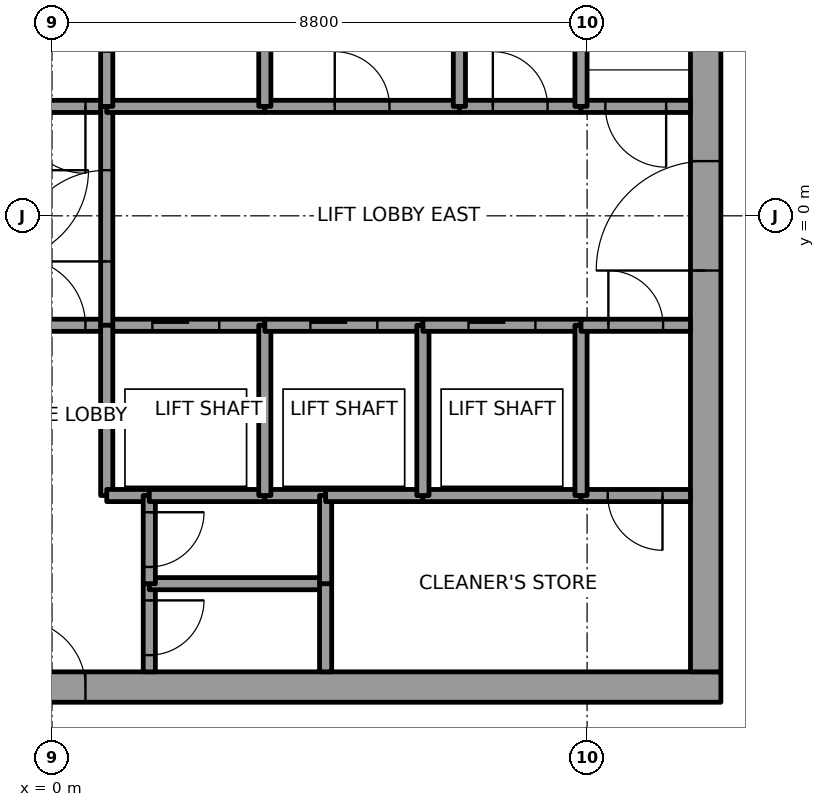
"""IFC4 building model, lengths in metres.
Left out: names, types, materials, properties, quantities, classifications, styles, units other than length and angle.
Written with IfcOpenShell. Run it as: python <this file> out.ifc"""

import sys

from ifc_helpers import new_model, si_unit, direction, frame, frame_2d, origin, place, context, subcontext, project, spatial, rectangle, extrude, element, fill, save


model = new_model("IFC4")
c1 = context("Model", 3, precision=1e-05, world=origin(), true_north=direction((0.0, 1.0)))
c2 = subcontext(c1, "Body", "Model", "MODEL_VIEW")
j1 = project(units=[si_unit("LENGTHUNIT", "METRE"), si_unit("PLANEANGLEUNIT", "RADIAN")], contexts=[c1])
p1 = place(None, origin())
s1 = spatial("IfcSite", under=j1, at=p1, CompositionType="ELEMENT")
p2 = place(p1, origin())
s2 = spatial("IfcBuilding", under=s1, at=p2, CompositionType="ELEMENT")
p3 = place(p2, frame((0.0, 0.0, 291.0)))
s3 = spatial("IfcBuildingStorey", under=s2, at=p3, CompositionType="ELEMENT", Elevation=291.0)
p4 = place(p3, frame((-11.0, -7.75, 0.0), z_axis=(0.0, 0.0, 1.0), x_axis=(1.0, 0.0, 0.0)))
e1 = element("IfcWall", 1, at=p4, inside=s3, PredefinedType="SHEAR", context=c2, shape_type="SweptSolid", body=[
    extrude(rectangle(XDim=22.0, YDim=0.5, at=frame_2d((11.0, 0.0))), origin(), (0.0, 0.0, 1.0), 4.0),
])
p5 = place(p4, frame((10.45, 0.0, 0.0)))
e2 = element("IfcOpeningElement", 2, at=p5, cuts=e1, PredefinedType="OPENING", context=c2, shape_type="SweptSolid", body=[
    extrude(rectangle(XDim=1.1, YDim=2.1, at=frame_2d((0.55, 1.05))), frame((0.0, 0.25, 0.0), z_axis=(0.0, -1.0, 0.0), x_axis=(1.0, 0.0, 0.0)), (0.0, 0.0, 1.0), 0.5),
])
p6 = place(p3, frame((10.75, -7.5, 0.0), z_axis=(0.0, 0.0, 1.0), x_axis=(0.0, 1.0, 0.0)))
e3 = element("IfcWall", 3, at=p6, inside=s3, PredefinedType="SHEAR", context=c2, shape_type="SweptSolid", body=[
    extrude(rectangle(XDim=15.0, YDim=0.5, at=frame_2d((7.5, 0.0))), origin(), (0.0, 0.0, 1.0), 4.0),
])
p7 = place(p6, frame((6.6, 0.0, 0.0)))
e4 = element("IfcOpeningElement", 4, at=p7, cuts=e3, PredefinedType="OPENING", context=c2, shape_type="SweptSolid", body=[
    extrude(rectangle(XDim=1.8, YDim=2.1, at=frame_2d((0.9, 1.05))), frame((0.0, 0.25, 0.0), z_axis=(0.0, -1.0, 0.0), x_axis=(1.0, 0.0, 0.0)), (0.0, 0.0, 1.0), 0.5),
])
p8 = place(p3, frame((-0.9, -1.8, 0.0), z_axis=(0.0, 0.0, 1.0), x_axis=(1.0, 0.0, 0.0)))
e5 = element("IfcWall", 5, at=p8, inside=s3, PredefinedType="SOLIDWALL", context=c2, shape_type="SweptSolid", body=[
    extrude(rectangle(XDim=1.8, YDim=0.2, at=frame_2d((0.9, 0.0))), origin(), (0.0, 0.0, 1.0), 3.85),
])
p9 = place(p8, frame((0.35, 0.0, 0.0)))
e6 = element("IfcOpeningElement", 6, at=p9, cuts=e5, PredefinedType="OPENING", context=c2, shape_type="SweptSolid", body=[
    extrude(rectangle(XDim=1.1, YDim=2.1, at=frame_2d((0.55, 1.05))), frame((0.0, 0.1, 0.0), z_axis=(0.0, -1.0, 0.0), x_axis=(1.0, 0.0, 0.0)), (0.0, 0.0, 1.0), 0.2),
])
p10 = place(p3, frame((0.9, 1.8, 0.0), z_axis=(0.0, 0.0, 1.0), x_axis=(-1.0, 0.0, 0.0)))
e7 = element("IfcWall", 7, at=p10, inside=s3, PredefinedType="SOLIDWALL", context=c2, shape_type="SweptSolid", body=[
    extrude(rectangle(XDim=1.8, YDim=0.2, at=frame_2d((0.9, 0.0))), origin(), (0.0, 0.0, 1.0), 3.85),
])
p11 = place(p10, frame((0.35, 0.0, 0.0)))
e8 = element("IfcOpeningElement", 8, at=p11, cuts=e7, PredefinedType="OPENING", context=c2, shape_type="SweptSolid", body=[
    extrude(rectangle(XDim=1.1, YDim=2.1, at=frame_2d((0.55, 1.05))), frame((0.0, 0.1, 0.0), z_axis=(0.0, -1.0, 0.0), x_axis=(1.0, 0.0, 0.0)), (0.0, 0.0, 1.0), 0.2),
])
p12 = place(p3, frame((0.9, -1.8, 0.0), z_axis=(0.0, 0.0, 1.0), x_axis=(1.0, 0.0, 0.0)))
e9 = element("IfcWall", 9, at=p12, inside=s3, PredefinedType="SOLIDWALL", context=c2, shape_type="SweptSolid", body=[
    extrude(rectangle(XDim=2.6, YDim=0.2, at=frame_2d((1.3, 0.0))), origin(), (0.0, 0.0, 1.0), 3.85),
])
p13 = place(p12, frame((0.75, 0.0, 0.0)))
e10 = element("IfcOpeningElement", 10, at=p13, cuts=e9, PredefinedType="OPENING", context=c2, shape_type="SweptSolid", body=[
    extrude(rectangle(XDim=1.1, YDim=2.1, at=frame_2d((0.55, 1.05))), frame((0.0, 0.1, 0.0), z_axis=(0.0, -1.0, 0.0), x_axis=(1.0, 0.0, 0.0)), (0.0, 0.0, 1.0), 0.2),
])
p14 = place(p3, frame((0.9, -1.8, 0.0), z_axis=(0.0, 0.0, 1.0), x_axis=(0.0, 1.0, 0.0)))
e11 = element("IfcWall", 11, at=p14, inside=s3, PredefinedType="SOLIDWALL", context=c2, shape_type="SweptSolid", body=[
    extrude(rectangle(XDim=3.6, YDim=0.2, at=frame_2d((1.8, 0.0))), origin(), (0.0, 0.0, 1.0), 3.85),
])
p15 = place(p14, frame((1.05, 0.0, 0.0)))
e12 = element("IfcOpeningElement", 12, at=p15, cuts=e11, PredefinedType="OPENING", context=c2, shape_type="SweptSolid", body=[
    extrude(rectangle(XDim=1.5, YDim=2.1, at=frame_2d((0.75, 1.05))), frame((0.0, 0.1, 0.0), z_axis=(0.0, -1.0, 0.0), x_axis=(1.0, 0.0, 0.0)), (0.0, 0.0, 1.0), 0.2),
])
p16 = place(p3, frame((0.9, -1.8, 0.0), z_axis=(0.0, 0.0, 1.0), x_axis=(0.0, -1.0, 0.0)))
e13 = element("IfcWall", 13, at=p16, inside=s3, PredefinedType="SOLIDWALL", context=c2, shape_type="SweptSolid", body=[
    extrude(rectangle(XDim=2.8, YDim=0.2, at=frame_2d((1.4, 0.0))), origin(), (0.0, 0.0, 1.0), 3.85),
])
p17 = place(p3, frame((0.9, -4.6, 0.0), z_axis=(0.0, 0.0, 1.0), x_axis=(1.0, 0.0, 0.0)))
e14 = element("IfcWall", 14, at=p17, inside=s3, PredefinedType="SOLIDWALL", context=c2, shape_type="SweptSolid", body=[
    extrude(rectangle(XDim=0.7, YDim=0.2, at=frame_2d((0.35, 0.0))), origin(), (0.0, 0.0, 1.0), 3.85),
])
p18 = place(p3, frame((3.5, 1.8, 0.0), z_axis=(0.0, 0.0, 1.0), x_axis=(-1.0, 0.0, 0.0)))
e15 = element("IfcWall", 15, at=p18, inside=s3, PredefinedType="SOLIDWALL", context=c2, shape_type="SweptSolid", body=[
    extrude(rectangle(XDim=2.6, YDim=0.2, at=frame_2d((1.3, 0.0))), origin(), (0.0, 0.0, 1.0), 3.85),
])
p19 = place(p3, frame((0.9, 4.8, 0.0), z_axis=(0.0, 0.0, 1.0), x_axis=(0.0, -1.0, 0.0)))
e16 = element("IfcWall", 16, at=p19, inside=s3, PredefinedType="SOLIDWALL", context=c2, shape_type="SweptSolid", body=[
    extrude(rectangle(XDim=3.0, YDim=0.2, at=frame_2d((1.5, 0.0))), origin(), (0.0, 0.0, 1.0), 3.85),
])
p20 = place(p19, frame((0.9, 0.0, 0.0)))
e17 = element("IfcOpeningElement", 17, at=p20, cuts=e16, PredefinedType="OPENING", context=c2, shape_type="SweptSolid", body=[
    extrude(rectangle(XDim=1.2, YDim=2.1, at=frame_2d((0.6, 1.05))), frame((0.0, 0.1, 0.0), z_axis=(0.0, -1.0, 0.0), x_axis=(1.0, 0.0, 0.0)), (0.0, 0.0, 1.0), 0.2),
])
p21 = place(p3, frame((1.6, -6.05, 0.0), z_axis=(0.0, 0.0, 1.0), x_axis=(0.0, -1.0, 0.0)))
e18 = element("IfcWall", 18, at=p21, inside=s3, PredefinedType="SOLIDWALL", context=c2, shape_type="SweptSolid", body=[
    extrude(rectangle(XDim=1.45, YDim=0.2, at=frame_2d((0.725, 0.0))), origin(), (0.0, 0.0, 1.0), 3.85),
])
p22 = place(p21, frame((0.275, 0.0, 0.0)))
e19 = element("IfcOpeningElement", 19, at=p22, cuts=e18, PredefinedType="OPENING", context=c2, shape_type="SweptSolid", body=[
    extrude(rectangle(XDim=0.9, YDim=2.1, at=frame_2d((0.45, 1.05))), frame((0.0, 0.1, 0.0), z_axis=(0.0, -1.0, 0.0), x_axis=(1.0, 0.0, 0.0)), (0.0, 0.0, 1.0), 0.2),
])
p23 = place(p3, frame((4.5, -6.05, 0.0), z_axis=(0.0, 0.0, 1.0), x_axis=(-1.0, 0.0, 0.0)))
e20 = element("IfcWall", 20, at=p23, inside=s3, PredefinedType="SOLIDWALL", context=c2, shape_type="SweptSolid", body=[
    extrude(rectangle(XDim=2.9, YDim=0.2, at=frame_2d((1.45, 0.0))), origin(), (0.0, 0.0, 1.0), 3.85),
])
p24 = place(p3, frame((1.6, -4.6, 0.0), z_axis=(0.0, 0.0, 1.0), x_axis=(0.0, -1.0, 0.0)))
e21 = element("IfcWall", 21, at=p24, inside=s3, PredefinedType="SOLIDWALL", context=c2, shape_type="SweptSolid", body=[
    extrude(rectangle(XDim=1.45, YDim=0.2, at=frame_2d((0.725, 0.0))), origin(), (0.0, 0.0, 1.0), 3.85),
])
p25 = place(p24, frame((0.275, 0.0, 0.0)))
e22 = element("IfcOpeningElement", 22, at=p25, cuts=e21, PredefinedType="OPENING", context=c2, shape_type="SweptSolid", body=[
    extrude(rectangle(XDim=0.9, YDim=2.1, at=frame_2d((0.45, 1.05))), frame((0.0, 0.1, 0.0), z_axis=(0.0, -1.0, 0.0), x_axis=(1.0, 0.0, 0.0)), (0.0, 0.0, 1.0), 0.2),
])
p26 = place(p3, frame((3.5, -4.6, 0.0), z_axis=(0.0, 0.0, 1.0), x_axis=(-1.0, 0.0, 0.0)))
e23 = element("IfcWall", 23, at=p26, inside=s3, PredefinedType="SOLIDWALL", context=c2, shape_type="SweptSolid", body=[
    extrude(rectangle(XDim=1.9, YDim=0.2, at=frame_2d((0.95, 0.0))), origin(), (0.0, 0.0, 1.0), 3.85),
])
p27 = place(p3, frame((4.5, -4.6, 0.0), z_axis=(0.0, 0.0, 1.0), x_axis=(-1.0, 0.0, 0.0)))
e24 = element("IfcWall", 24, at=p27, inside=s3, PredefinedType="SOLIDWALL", context=c2, shape_type="SweptSolid", body=[
    extrude(rectangle(XDim=1.0, YDim=0.2, at=frame_2d((0.5, 0.0))), origin(), (0.0, 0.0, 1.0), 3.85),
])
p28 = place(p3, frame((3.5, -4.6, 0.0), z_axis=(0.0, 0.0, 1.0), x_axis=(0.0, 1.0, 0.0)))
e25 = element("IfcWall", 25, at=p28, inside=s3, PredefinedType="SOLIDWALL", context=c2, shape_type="SweptSolid", body=[
    extrude(rectangle(XDim=2.8, YDim=0.2, at=frame_2d((1.4, 0.0))), origin(), (0.0, 0.0, 1.0), 3.85),
])
p29 = place(p3, frame((3.5, -1.8, 0.0), z_axis=(0.0, 0.0, 1.0), x_axis=(1.0, 0.0, 0.0)))
e26 = element("IfcWall", 26, at=p29, inside=s3, PredefinedType="SOLIDWALL", context=c2, shape_type="SweptSolid", body=[
    extrude(rectangle(XDim=2.6, YDim=0.2, at=frame_2d((1.3, 0.0))), origin(), (0.0, 0.0, 1.0), 3.85),
])
p30 = place(p29, frame((0.75, 0.0, 0.0)))
e27 = element("IfcOpeningElement", 27, at=p30, cuts=e26, PredefinedType="OPENING", context=c2, shape_type="SweptSolid", body=[
    extrude(rectangle(XDim=1.1, YDim=2.1, at=frame_2d((0.55, 1.05))), frame((0.0, 0.1, 0.0), z_axis=(0.0, -1.0, 0.0), x_axis=(1.0, 0.0, 0.0)), (0.0, 0.0, 1.0), 0.2),
])
p31 = place(p3, frame((3.5, 1.8, 0.0), z_axis=(0.0, 0.0, 1.0), x_axis=(1.0, 0.0, 0.0)))
e28 = element("IfcWall", 28, at=p31, inside=s3, PredefinedType="SOLIDWALL", context=c2, shape_type="SweptSolid", body=[
    extrude(rectangle(XDim=3.2, YDim=0.2, at=frame_2d((1.6, 0.0))), origin(), (0.0, 0.0, 1.0), 3.85),
])
p32 = place(p31, frame((1.15, 0.0, 0.0)))
e29 = element("IfcOpeningElement", 29, at=p32, cuts=e28, PredefinedType="OPENING", context=c2, shape_type="SweptSolid", body=[
    extrude(rectangle(XDim=0.9, YDim=2.1, at=frame_2d((0.45, 1.05))), frame((0.0, 0.1, 0.0), z_axis=(0.0, -1.0, 0.0), x_axis=(1.0, 0.0, 0.0)), (0.0, 0.0, 1.0), 0.2),
])
p33 = place(p3, frame((3.5, 4.6, 0.0), z_axis=(0.0, 0.0, 1.0), x_axis=(0.0, -1.0, 0.0)))
e30 = element("IfcWall", 30, at=p33, inside=s3, PredefinedType="SOLIDWALL", context=c2, shape_type="SweptSolid", body=[
    extrude(rectangle(XDim=2.8, YDim=0.2, at=frame_2d((1.4, 0.0))), origin(), (0.0, 0.0, 1.0), 3.85),
])
for number, where, z_axis, x_axis in (
    (31, (4.5, -6.05, 0.0), (0.0, 0.0, 1.0), (0.0, -1.0, 0.0)),
    (32, (4.5, -4.6, 0.0), (0.0, 0.0, 1.0), (0.0, -1.0, 0.0)),
):
    element("IfcWall", number, at=place(p3, frame(where, z_axis=z_axis, x_axis=x_axis)), inside=s3, PredefinedType="SOLIDWALL", context=c2, shape_type="SweptSolid", body=[
        extrude(rectangle(XDim=1.45, YDim=0.2, at=frame_2d((0.725, 0.0))), origin(), (0.0, 0.0, 1.0), 3.85),
    ])
p34 = place(p3, frame((6.1, -4.6, 0.0), z_axis=(0.0, 0.0, 1.0), x_axis=(-1.0, 0.0, 0.0)))
e33 = element("IfcWall", 33, at=p34, inside=s3, PredefinedType="SOLIDWALL", context=c2, shape_type="SweptSolid", body=[
    extrude(rectangle(XDim=1.6, YDim=0.2, at=frame_2d((0.8, 0.0))), origin(), (0.0, 0.0, 1.0), 3.85),
])
p35 = place(p3, frame((8.7, -4.6, 0.0), z_axis=(0.0, 0.0, 1.0), x_axis=(-1.0, 0.0, 0.0)))
e34 = element("IfcWall", 34, at=p35, inside=s3, PredefinedType="SOLIDWALL", context=c2, shape_type="SweptSolid", body=[
    extrude(rectangle(XDim=2.6, YDim=0.2, at=frame_2d((1.3, 0.0))), origin(), (0.0, 0.0, 1.0), 3.85),
])
p36 = place(p3, frame((6.1, -4.6, 0.0), z_axis=(0.0, 0.0, 1.0), x_axis=(0.0, 1.0, 0.0)))
e35 = element("IfcWall", 35, at=p36, inside=s3, PredefinedType="SOLIDWALL", context=c2, shape_type="SweptSolid", body=[
    extrude(rectangle(XDim=2.8, YDim=0.2, at=frame_2d((1.4, 0.0))), origin(), (0.0, 0.0, 1.0), 3.85),
])
p37 = place(p3, frame((6.1, -1.8, 0.0), z_axis=(0.0, 0.0, 1.0), x_axis=(1.0, 0.0, 0.0)))
e36 = element("IfcWall", 36, at=p37, inside=s3, PredefinedType="SOLIDWALL", context=c2, shape_type="SweptSolid", body=[
    extrude(rectangle(XDim=2.6, YDim=0.2, at=frame_2d((1.3, 0.0))), origin(), (0.0, 0.0, 1.0), 3.85),
])
p38 = place(p37, frame((0.75, 0.0, 0.0)))
e37 = element("IfcOpeningElement", 37, at=p38, cuts=e36, PredefinedType="OPENING", context=c2, shape_type="SweptSolid", body=[
    extrude(rectangle(XDim=1.1, YDim=2.1, at=frame_2d((0.55, 1.05))), frame((0.0, 0.1, 0.0), z_axis=(0.0, -1.0, 0.0), x_axis=(1.0, 0.0, 0.0)), (0.0, 0.0, 1.0), 0.2),
])
p39 = place(p3, frame((6.7, 1.8, 0.0), z_axis=(0.0, 0.0, 1.0), x_axis=(1.0, 0.0, 0.0)))
e38 = element("IfcWall", 38, at=p39, inside=s3, PredefinedType="SOLIDWALL", context=c2, shape_type="SweptSolid", body=[
    extrude(rectangle(XDim=2.0, YDim=0.2, at=frame_2d((1.0, 0.0))), origin(), (0.0, 0.0, 1.0), 3.85),
])
p40 = place(p39, frame((0.55, 0.0, 0.0)))
e39 = element("IfcOpeningElement", 39, at=p40, cuts=e38, PredefinedType="OPENING", context=c2, shape_type="SweptSolid", body=[
    extrude(rectangle(XDim=0.9, YDim=2.1, at=frame_2d((0.45, 1.05))), frame((0.0, 0.1, 0.0), z_axis=(0.0, -1.0, 0.0), x_axis=(1.0, 0.0, 0.0)), (0.0, 0.0, 1.0), 0.2),
])
p41 = place(p3, frame((6.7, 1.8, 0.0), z_axis=(0.0, 0.0, 1.0), x_axis=(0.0, 1.0, 0.0)))
e40 = element("IfcWall", 40, at=p41, inside=s3, PredefinedType="SOLIDWALL", context=c2, shape_type="SweptSolid", body=[
    extrude(rectangle(XDim=2.8, YDim=0.2, at=frame_2d((1.4, 0.0))), origin(), (0.0, 0.0, 1.0), 3.85),
])
p42 = place(p3, frame((10.5, -4.6, 0.0), z_axis=(0.0, 0.0, 1.0), x_axis=(-1.0, 0.0, 0.0)))
e41 = element("IfcWall", 41, at=p42, inside=s3, PredefinedType="SOLIDWALL", context=c2, shape_type="SweptSolid", body=[
    extrude(rectangle(XDim=1.8, YDim=0.2, at=frame_2d((0.9, 0.0))), origin(), (0.0, 0.0, 1.0), 3.85),
])
p43 = place(p42, frame((0.46, 0.0, 0.0)))
e42 = element("IfcOpeningElement", 42, at=p43, cuts=e41, PredefinedType="OPENING", context=c2, shape_type="SweptSolid", body=[
    extrude(rectangle(XDim=0.9, YDim=2.1, at=frame_2d((0.45, 1.05))), frame((0.0, 0.1, 0.0), z_axis=(0.0, -1.0, 0.0), x_axis=(1.0, 0.0, 0.0)), (0.0, 0.0, 1.0), 0.2),
])
p44 = place(p3, frame((8.7, -1.8, 0.0), z_axis=(0.0, 0.0, 1.0), x_axis=(0.0, -1.0, 0.0)))
e43 = element("IfcWall", 43, at=p44, inside=s3, PredefinedType="SOLIDWALL", context=c2, shape_type="SweptSolid", body=[
    extrude(rectangle(XDim=2.8, YDim=0.2, at=frame_2d((1.4, 0.0))), origin(), (0.0, 0.0, 1.0), 3.85),
])
p45 = place(p3, frame((8.7, -1.8, 0.0), z_axis=(0.0, 0.0, 1.0), x_axis=(1.0, 0.0, 0.0)))
e44 = element("IfcWall", 44, at=p45, inside=s3, PredefinedType="SOLIDWALL", context=c2, shape_type="SweptSolid", body=[
    extrude(rectangle(XDim=1.8, YDim=0.2, at=frame_2d((0.9, 0.0))), origin(), (0.0, 0.0, 1.0), 3.85),
])
p46 = place(p45, frame((0.45, 0.0, 0.0)))
e45 = element("IfcOpeningElement", 45, at=p46, cuts=e44, PredefinedType="OPENING", context=c2, shape_type="SweptSolid", body=[
    extrude(rectangle(XDim=0.9, YDim=2.1, at=frame_2d((0.45, 1.05))), frame((0.0, 0.1, 0.0), z_axis=(0.0, -1.0, 0.0), x_axis=(1.0, 0.0, 0.0)), (0.0, 0.0, 1.0), 0.2),
])
p47 = place(p3, frame((10.5, 1.8, 0.0), z_axis=(0.0, 0.0, 1.0), x_axis=(-1.0, 0.0, 0.0)))
e46 = element("IfcWall", 46, at=p47, inside=s3, PredefinedType="SOLIDWALL", context=c2, shape_type="SweptSolid", body=[
    extrude(rectangle(XDim=1.8, YDim=0.2, at=frame_2d((0.9, 0.0))), origin(), (0.0, 0.0, 1.0), 3.85),
])
p48 = place(p47, frame((0.4, 0.0, 0.0)))
e47 = element("IfcOpeningElement", 47, at=p48, cuts=e46, PredefinedType="OPENING", context=c2, shape_type="SweptSolid", body=[
    extrude(rectangle(XDim=1.0, YDim=2.1, at=frame_2d((0.5, 1.05))), frame((0.0, 0.1, 0.0), z_axis=(0.0, -1.0, 0.0), x_axis=(1.0, 0.0, 0.0)), (0.0, 0.0, 1.0), 0.2),
])
p49 = place(p3, frame((8.7, 1.8, 0.0), z_axis=(0.0, 0.0, 1.0), x_axis=(0.0, 1.0, 0.0)))
e48 = element("IfcWall", 48, at=p49, inside=s3, PredefinedType="SOLIDWALL", context=c2, shape_type="SweptSolid", body=[
    extrude(rectangle(XDim=2.8, YDim=0.2, at=frame_2d((1.4, 0.0))), origin(), (0.0, 0.0, 1.0), 3.85),
])
p50 = place(p13, origin())
e49 = element("IfcDoor", 49, at=p50, inside=s3, OperationType="SLIDING_TO_LEFT", PredefinedType="DOOR", context=c2, shape_type="SweptSolid", body=[
    extrude(rectangle(XDim=1.1, YDim=2.1, at=frame_2d((0.55, 1.05))), frame((0.0, 0.025, 0.0), z_axis=(0.0, -1.0, 0.0), x_axis=(1.0, 0.0, 0.0)), (0.0, 0.0, 1.0), 0.05),
])
fill(e10, e49)
p51 = place(p30, origin())
e50 = element("IfcDoor", 50, at=p51, inside=s3, OperationType="SLIDING_TO_LEFT", PredefinedType="DOOR", context=c2, shape_type="SweptSolid", body=[
    extrude(rectangle(XDim=1.1, YDim=2.1, at=frame_2d((0.55, 1.05))), frame((0.0, 0.025, 0.0), z_axis=(0.0, -1.0, 0.0), x_axis=(1.0, 0.0, 0.0)), (0.0, 0.0, 1.0), 0.05),
])
fill(e27, e50)
p52 = place(p38, origin())
e51 = element("IfcDoor", 51, at=p52, inside=s3, OperationType="SLIDING_TO_LEFT", PredefinedType="DOOR", context=c2, shape_type="SweptSolid", body=[
    extrude(rectangle(XDim=1.1, YDim=2.1, at=frame_2d((0.55, 1.05))), frame((0.0, 0.025, 0.0), z_axis=(0.0, -1.0, 0.0), x_axis=(1.0, 0.0, 0.0)), (0.0, 0.0, 1.0), 0.05),
])
fill(e37, e51)
p53 = place(p15, origin())
e52 = element("IfcDoor", 52, at=p53, inside=s3, OperationType="DOUBLE_DOOR_SINGLE_SWING", PredefinedType="DOOR", context=c2, shape_type="SweptSolid", body=[
    extrude(rectangle(XDim=1.5, YDim=2.1, at=frame_2d((0.75, 1.05))), frame((0.0, 0.025, 0.0), z_axis=(0.0, -1.0, 0.0), x_axis=(1.0, 0.0, 0.0)), (0.0, 0.0, 1.0), 0.05),
])
fill(e12, e52)
p54 = place(p11, origin())
e53 = element("IfcDoor", 53, at=p54, inside=s3, OperationType="SINGLE_SWING_LEFT", PredefinedType="DOOR", context=c2, shape_type="SweptSolid", body=[
    extrude(rectangle(XDim=1.1, YDim=2.1, at=frame_2d((0.55, 1.05))), frame((0.0, 0.025, 0.0), z_axis=(0.0, -1.0, 0.0), x_axis=(1.0, 0.0, 0.0)), (0.0, 0.0, 1.0), 0.05),
])
fill(e8, e53)
p55 = place(p9, origin())
e54 = element("IfcDoor", 54, at=p55, inside=s3, OperationType="SINGLE_SWING_RIGHT", PredefinedType="DOOR", context=c2, shape_type="SweptSolid", body=[
    extrude(rectangle(XDim=1.1, YDim=2.1, at=frame_2d((0.55, 1.05))), frame((0.0, 0.025, 0.0), z_axis=(0.0, -1.0, 0.0), x_axis=(1.0, 0.0, 0.0)), (0.0, 0.0, 1.0), 0.05),
])
fill(e6, e54)
p56 = place(p48, origin())
e55 = element("IfcDoor", 55, at=p56, inside=s3, OperationType="SINGLE_SWING_RIGHT", PredefinedType="DOOR", context=c2, shape_type="SweptSolid", body=[
    extrude(rectangle(XDim=1.0, YDim=2.1, at=frame_2d((0.5, 1.05))), frame((0.0, 0.025, 0.0), z_axis=(0.0, -1.0, 0.0), x_axis=(1.0, 0.0, 0.0)), (0.0, 0.0, 1.0), 0.05),
])
fill(e47, e55)
p57 = place(p32, origin())
e56 = element("IfcDoor", 56, at=p57, inside=s3, OperationType="SINGLE_SWING_LEFT", PredefinedType="DOOR", context=c2, shape_type="SweptSolid", body=[
    extrude(rectangle(XDim=0.9, YDim=2.1, at=frame_2d((0.45, 1.05))), frame((0.0, 0.025, 0.0), z_axis=(0.0, -1.0, 0.0), x_axis=(1.0, 0.0, 0.0)), (0.0, 0.0, 1.0), 0.05),
])
fill(e29, e56)
p58 = place(p40, origin())
e57 = element("IfcDoor", 57, at=p58, inside=s3, OperationType="SINGLE_SWING_LEFT", PredefinedType="DOOR", context=c2, shape_type="SweptSolid", body=[
    extrude(rectangle(XDim=0.9, YDim=2.1, at=frame_2d((0.45, 1.05))), frame((0.0, 0.025, 0.0), z_axis=(0.0, -1.0, 0.0), x_axis=(1.0, 0.0, 0.0)), (0.0, 0.0, 1.0), 0.05),
])
fill(e39, e57)
p59 = place(p43, origin())
e58 = element("IfcDoor", 58, at=p59, inside=s3, OperationType="SINGLE_SWING_RIGHT", PredefinedType="DOOR", context=c2, shape_type="SweptSolid", body=[
    extrude(rectangle(XDim=0.9, YDim=2.1, at=frame_2d((0.45, 1.05))), frame((0.0, 0.025, 0.0), z_axis=(0.0, -1.0, 0.0), x_axis=(1.0, 0.0, 0.0)), (0.0, 0.0, 1.0), 0.05),
])
fill(e42, e58)
p60 = place(p46, origin())
e59 = element("IfcDoor", 59, at=p60, inside=s3, OperationType="SINGLE_SWING_RIGHT", PredefinedType="DOOR", context=c2, shape_type="SweptSolid", body=[
    extrude(rectangle(XDim=0.9, YDim=2.1, at=frame_2d((0.45, 1.05))), frame((0.0, 0.025, 0.0), z_axis=(0.0, -1.0, 0.0), x_axis=(1.0, 0.0, 0.0)), (0.0, 0.0, 1.0), 0.05),
])
fill(e45, e59)
p61 = place(p22, origin())
e60 = element("IfcDoor", 60, at=p61, inside=s3, OperationType="SINGLE_SWING_LEFT", PredefinedType="DOOR", context=c2, shape_type="SweptSolid", body=[
    extrude(rectangle(XDim=0.9, YDim=2.1, at=frame_2d((0.45, 1.05))), frame((0.0, 0.025, 0.0), z_axis=(0.0, -1.0, 0.0), x_axis=(1.0, 0.0, 0.0)), (0.0, 0.0, 1.0), 0.05),
])
fill(e19, e60)
p62 = place(p25, origin())
e61 = element("IfcDoor", 61, at=p62, inside=s3, OperationType="SINGLE_SWING_LEFT", PredefinedType="DOOR", context=c2, shape_type="SweptSolid", body=[
    extrude(rectangle(XDim=0.9, YDim=2.1, at=frame_2d((0.45, 1.05))), frame((0.0, 0.025, 0.0), z_axis=(0.0, -1.0, 0.0), x_axis=(1.0, 0.0, 0.0)), (0.0, 0.0, 1.0), 0.05),
])
fill(e22, e61)
p63 = place(p7, origin())
e62 = element("IfcDoor", 62, at=p63, inside=s3, OperationType="DOUBLE_DOOR_SINGLE_SWING", PredefinedType="DOOR", context=c2, shape_type="SweptSolid", body=[
    extrude(rectangle(XDim=1.8, YDim=2.1, at=frame_2d((0.9, 1.05))), frame((0.0, 0.025, 0.0), z_axis=(0.0, -1.0, 0.0), x_axis=(1.0, 0.0, 0.0)), (0.0, 0.0, 1.0), 0.05),
])
fill(e4, e62)
p64 = place(p5, origin())
e63 = element("IfcDoor", 63, at=p64, inside=s3, OperationType="SINGLE_SWING_RIGHT", PredefinedType="DOOR", context=c2, shape_type="SweptSolid", body=[
    extrude(rectangle(XDim=1.1, YDim=2.1, at=frame_2d((0.55, 1.05))), frame((0.0, 0.025, 0.0), z_axis=(0.0, -1.0, 0.0), x_axis=(1.0, 0.0, 0.0)), (0.0, 0.0, 1.0), 0.05),
])
fill(e2, e63)
save(model, sys.argv[1])
